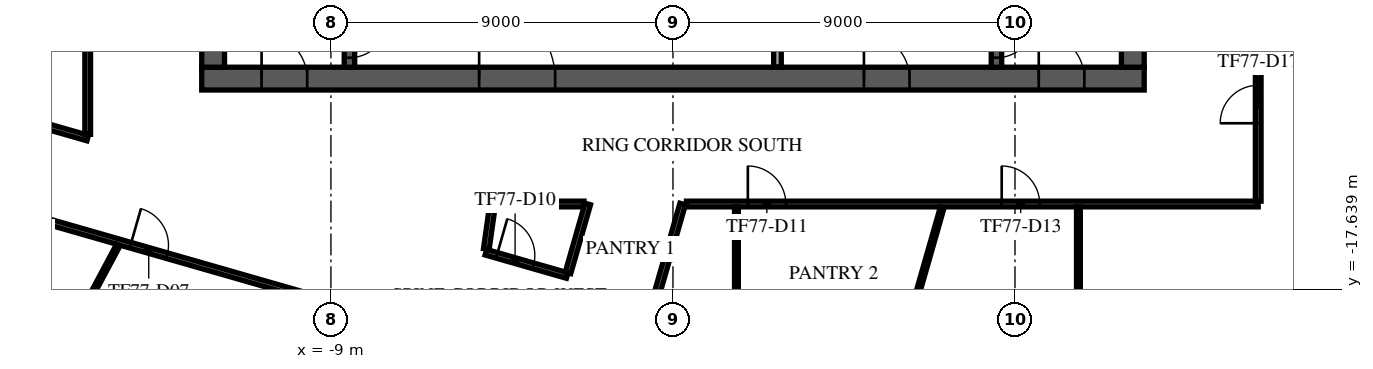
"""IFC4 building model, lengths in metres.
Left out: names, types, materials, properties, quantities, classifications, styles, units other than length and angle.
Written with IfcOpenShell. Run it as: python <this file> out.ifc"""

import sys

from ifc_helpers import new_model, si_unit, direction, frame, frame_2d, origin, place, context, subcontext, project, spatial, rectangle, extrude, element, fill, save


model = new_model("IFC4")
c1 = context("Model", 3, precision=1e-05, world=origin(), true_north=direction((0.0, 1.0)))
c2 = subcontext(c1, "Body", "Model", "MODEL_VIEW")
j1 = project(units=[si_unit("LENGTHUNIT", "METRE"), si_unit("PLANEANGLEUNIT", "RADIAN")], contexts=[c1])
p1 = place(None, origin())
s1 = spatial("IfcSite", under=j1, at=p1, CompositionType="ELEMENT")
p2 = place(p1, origin())
s2 = spatial("IfcBuilding", under=s1, at=p2, CompositionType="ELEMENT")
p3 = place(p2, frame((0.0, 0.0, 324.5)))
s3 = spatial("IfcBuildingStorey", under=s2, at=p3, CompositionType="ELEMENT", Elevation=324.5)
p4 = place(p3, frame((-12.4, -12.1, 0.0), z_axis=(0.0, 0.0, 1.0), x_axis=(1.0, 0.0, 0.0)))
e1 = element("IfcWall", 1, at=p4, inside=s3, PredefinedType="SHEAR", context=c2, shape_type="SweptSolid", body=[
    extrude(rectangle(XDim=24.8, YDim=0.6, at=frame_2d((12.4, 0.0))), origin(), (0.0, 0.0, 1.0), 3.65),
])
p5 = place(p4, frame((7.3, 0.0, 0.0)))
e2 = element("IfcOpeningElement", 2, at=p5, cuts=e1, PredefinedType="OPENING", context=c2, shape_type="SweptSolid", body=[
    extrude(rectangle(XDim=2.0, YDim=2.1, at=frame_2d((1.0, 1.05))), frame((0.0, 0.31, 0.0), z_axis=(0.0, -1.0, 0.0), x_axis=(1.0, 0.0, 0.0)), (0.0, 0.0, 1.0), 0.62),
])
p6 = place(p4, frame((17.425, 0.0, 0.0)))
e3 = element("IfcOpeningElement", 3, at=p6, cuts=e1, PredefinedType="OPENING", context=c2, shape_type="SweptSolid", body=[
    extrude(rectangle(XDim=1.2, YDim=2.1, at=frame_2d((0.6, 1.05))), frame((0.0, 0.31, 0.0), z_axis=(0.0, -1.0, 0.0), x_axis=(1.0, 0.0, 0.0)), (0.0, 0.0, 1.0), 0.62),
])
p7 = place(p4, frame((1.575, 0.0, 0.0)))
e4 = element("IfcOpeningElement", 4, at=p7, cuts=e1, PredefinedType="OPENING", context=c2, shape_type="SweptSolid", body=[
    extrude(rectangle(XDim=1.2, YDim=2.1, at=frame_2d((0.6, 1.05))), frame((0.0, 0.31, 0.0), z_axis=(0.0, -1.0, 0.0), x_axis=(1.0, 0.0, 0.0)), (0.0, 0.0, 1.0), 0.62),
])
p8 = place(p4, frame((22.025, 0.0, 0.0)))
e5 = element("IfcOpeningElement", 5, at=p8, cuts=e1, PredefinedType="OPENING", context=c2, shape_type="SweptSolid", body=[
    extrude(rectangle(XDim=1.2, YDim=2.1, at=frame_2d((0.6, 1.05))), frame((0.0, 0.31, 0.0), z_axis=(0.0, -1.0, 0.0), x_axis=(1.0, 0.0, 0.0)), (0.0, 0.0, 1.0), 0.62),
])
p9 = place(p3, frame((12.1, -11.8, 0.0), z_axis=(0.0, 0.0, 1.0), x_axis=(0.0, 1.0, 0.0)))
e6 = element("IfcWall", 6, at=p9, inside=s3, PredefinedType="SHEAR", context=c2, shape_type="SweptSolid", body=[
    extrude(rectangle(XDim=23.6, YDim=0.6, at=frame_2d((11.8, 0.0))), origin(), (0.0, 0.0, 1.0), 3.65),
])
p10 = place(p9, frame((10.6, 0.0, 0.0)))
e7 = element("IfcOpeningElement", 7, at=p10, cuts=e6, PredefinedType="OPENING", context=c2, shape_type="SweptSolid", body=[
    extrude(rectangle(XDim=2.4, YDim=2.4, at=frame_2d((1.2, 1.2))), frame((0.0, 0.31, 0.0), z_axis=(0.0, -1.0, 0.0), x_axis=(1.0, 0.0, 0.0)), (0.0, 0.0, 1.0), 0.62),
])
p11 = place(p3, frame((-12.1, -11.8, 0.0), z_axis=(0.0, 0.0, 1.0), x_axis=(0.0, 1.0, 0.0)))
e8 = element("IfcWall", 8, at=p11, inside=s3, PredefinedType="SHEAR", context=c2, shape_type="SweptSolid", body=[
    extrude(rectangle(XDim=23.6, YDim=0.6, at=frame_2d((11.8, 0.0))), origin(), (0.0, 0.0, 1.0), 3.65),
])
p12 = place(p11, frame((10.6, 0.0, 0.0)))
e9 = element("IfcOpeningElement", 9, at=p12, cuts=e8, PredefinedType="OPENING", context=c2, shape_type="SweptSolid", body=[
    extrude(rectangle(XDim=2.4, YDim=2.4, at=frame_2d((1.2, 1.2))), frame((0.0, 0.31, 0.0), z_axis=(0.0, -1.0, 0.0), x_axis=(1.0, 0.0, 0.0)), (0.0, 0.0, 1.0), 0.62),
])
p13 = place(p3, frame((-8.512, -4.55, 0.0), z_axis=(0.0, 0.0, 1.0), x_axis=(0.0, -1.0, 0.0)))
e10 = element("IfcWall", 10, at=p13, inside=s3, PredefinedType="SOLIDWALL", context=c2, shape_type="SweptSolid", body=[
    extrude(rectangle(XDim=7.25, YDim=0.275, at=frame_2d((3.625, 0.0))), origin(), (0.0, 0.0, 1.0), 3.65),
])
p14 = place(p13, frame((6.0, 0.0, 0.0)))
e11 = element("IfcOpeningElement", 11, at=p14, cuts=e10, PredefinedType="OPENING", context=c2, shape_type="SweptSolid", body=[
    extrude(rectangle(XDim=1.0, YDim=2.1, at=frame_2d((0.5, 1.05))), frame((0.0, 0.147, 0.0), z_axis=(0.0, -1.0, 0.0), x_axis=(1.0, 0.0, 0.0)), (0.0, 0.0, 1.0), 0.295),
])
p15 = place(p3, frame((8.512, -4.55, 0.0), z_axis=(0.0, 0.0, 1.0), x_axis=(0.0, -1.0, 0.0)))
e12 = element("IfcWall", 12, at=p15, inside=s3, PredefinedType="SOLIDWALL", context=c2, shape_type="SweptSolid", body=[
    extrude(rectangle(XDim=7.25, YDim=0.275, at=frame_2d((3.625, 0.0))), origin(), (0.0, 0.0, 1.0), 3.65),
])
p16 = place(p15, frame((6.0, 0.0, 0.0)))
e13 = element("IfcOpeningElement", 13, at=p16, cuts=e12, PredefinedType="OPENING", context=c2, shape_type="SweptSolid", body=[
    extrude(rectangle(XDim=1.0, YDim=2.1, at=frame_2d((0.5, 1.05))), frame((0.0, 0.147, 0.0), z_axis=(0.0, -1.0, 0.0), x_axis=(1.0, 0.0, 0.0)), (0.0, 0.0, 1.0), 0.295),
])
p17 = place(p3, frame((2.75, -11.795, 0.0), z_axis=(0.0, 0.0, 1.0), x_axis=(0.0, 1.0, 0.0)))
e14 = element("IfcWall", 14, at=p17, inside=s3, PredefinedType="PARTITIONING", context=c2, shape_type="SweptSolid", body=[
    extrude(rectangle(XDim=2.99, YDim=0.2, at=frame_2d((1.495, 0.0))), origin(), (0.0, 0.0, 1.0), 3.65),
])
p18 = place(p3, frame((-24.007, -13.694, 0.0), z_axis=(0.0, 0.0, 1.0), x_axis=(0.961264140923, -0.275628828998, 0.0)))
e15 = element("IfcWall", 15, at=p18, inside=s3, PredefinedType="PARTITIONING", context=c2, shape_type="SweptSolid", body=[
    extrude(rectangle(XDim=38.68, YDim=0.15, at=frame_2d((19.34, 0.0))), origin(), (0.0, 0.0, 1.0), 3.25),
])
p19 = place(p18, frame((0.3, 0.0, 0.0)))
e16 = element("IfcOpeningElement", 16, at=p19, cuts=e15, PredefinedType="OPENING", context=c2, shape_type="SweptSolid", body=[
    extrude(rectangle(XDim=1.8, YDim=2.1, at=frame_2d((0.9, 1.05))), frame((0.0, 0.085, 0.0), z_axis=(0.0, -1.0, 0.0), x_axis=(1.0, 0.0, 0.0)), (0.0, 0.0, 1.0), 0.17),
])
p20 = place(p18, frame((5.55, 0.0, 0.0)))
e17 = element("IfcOpeningElement", 17, at=p20, cuts=e15, PredefinedType="OPENING", context=c2, shape_type="SweptSolid", body=[
    extrude(rectangle(XDim=1.0, YDim=2.1, at=frame_2d((0.5, 1.05))), frame((0.0, 0.085, 0.0), z_axis=(0.0, -1.0, 0.0), x_axis=(1.0, 0.0, 0.0)), (0.0, 0.0, 1.0), 0.17),
])
p21 = place(p18, frame((10.125, 0.0, 0.0)))
e18 = element("IfcOpeningElement", 18, at=p21, cuts=e15, PredefinedType="OPENING", context=c2, shape_type="SweptSolid", body=[
    extrude(rectangle(XDim=1.0, YDim=2.1, at=frame_2d((0.5, 1.05))), frame((0.0, 0.085, 0.0), z_axis=(0.0, -1.0, 0.0), x_axis=(1.0, 0.0, 0.0)), (0.0, 0.0, 1.0), 0.17),
])
p22 = place(p18, frame((23.776, 0.0, 0.0)))
e19 = element("IfcOpeningElement", 19, at=p22, cuts=e15, PredefinedType="OPENING", context=c2, shape_type="SweptSolid", body=[
    extrude(rectangle(XDim=1.0, YDim=2.1, at=frame_2d((0.5, 1.05))), frame((0.0, 0.085, 0.0), z_axis=(0.0, -1.0, 0.0), x_axis=(1.0, 0.0, 0.0)), (0.0, 0.0, 1.0), 0.17),
])
p23 = place(p18, frame((31.675, 0.0, 0.0)))
e20 = element("IfcOpeningElement", 20, at=p23, cuts=e15, PredefinedType="OPENING", context=c2, shape_type="SweptSolid", body=[
    extrude(rectangle(XDim=1.8, YDim=2.1, at=frame_2d((0.9, 1.05))), frame((0.0, 0.085, 0.0), z_axis=(0.0, -1.0, 0.0), x_axis=(1.0, 0.0, 0.0)), (0.0, 0.0, 1.0), 0.17),
])
p24 = place(p3, frame((-23.345, -11.387, 0.0), z_axis=(0.0, 0.0, 1.0), x_axis=(0.961258213807, -0.275649499163, 0.0)))
e21 = element("IfcWall", 21, at=p24, inside=s3, PredefinedType="PARTITIONING", context=c2, shape_type="SweptSolid", body=[
    extrude(rectangle(XDim=8.265, YDim=0.15, at=frame_2d((4.133, 0.0))), origin(), (0.0, 0.0, 1.0), 3.25),
])
p25 = place(p3, frame((-15.4, -13.565, 0.0), z_axis=(0.0, 0.0, 1.0), x_axis=(0.0, 1.0, 0.0)))
e22 = element("IfcWall", 22, at=p25, inside=s3, PredefinedType="PARTITIONING", context=c2, shape_type="SweptSolid", body=[
    extrude(rectangle(XDim=28.965, YDim=0.15, at=frame_2d((14.483, 0.0))), origin(), (0.0, 0.0, 1.0), 3.25),
])
p26 = place(p25, frame((5.986, 0.0, 0.0)))
e23 = element("IfcOpeningElement", 23, at=p26, cuts=e22, PredefinedType="OPENING", context=c2, shape_type="SweptSolid", body=[
    extrude(rectangle(XDim=1.0, YDim=2.1, at=frame_2d((0.5, 1.05))), frame((0.0, 0.085, 0.0), z_axis=(0.0, -1.0, 0.0), x_axis=(1.0, 0.0, 0.0)), (0.0, 0.0, 1.0), 0.17),
])
p27 = place(p25, frame((17.249, 0.0, 0.0)))
e24 = element("IfcOpeningElement", 24, at=p27, cuts=e22, PredefinedType="OPENING", context=c2, shape_type="SweptSolid", body=[
    extrude(rectangle(XDim=1.0, YDim=2.1, at=frame_2d((0.5, 1.05))), frame((0.0, 0.085, 0.0), z_axis=(0.0, -1.0, 0.0), x_axis=(1.0, 0.0, 0.0)), (0.0, 0.0, 1.0), 0.17),
])
p28 = place(p25, frame((25.571, 0.0, 0.0)))
e25 = element("IfcOpeningElement", 25, at=p28, cuts=e22, PredefinedType="OPENING", context=c2, shape_type="SweptSolid", body=[
    extrude(rectangle(XDim=1.0, YDim=2.1, at=frame_2d((0.5, 1.05))), frame((0.0, 0.085, 0.0), z_axis=(0.0, -1.0, 0.0), x_axis=(1.0, 0.0, 0.0)), (0.0, 0.0, 1.0), 0.17),
])
p29 = place(p3, frame((-4.923, -16.669, 0.0), z_axis=(0.0, 0.0, 1.0), x_axis=(0.961254639508, -0.275661963325, 0.0)))
e26 = element("IfcWall", 26, at=p29, inside=s3, PredefinedType="PARTITIONING", context=c2, shape_type="SweptSolid", body=[
    extrude(rectangle(XDim=2.227, YDim=0.15, at=frame_2d((1.114, 0.0))), origin(), (0.0, 0.0, 1.0), 3.65),
])
p30 = place(p29, frame((0.3, 0.0, 0.0)))
e27 = element("IfcOpeningElement", 27, at=p30, cuts=e26, PredefinedType="OPENING", context=c2, shape_type="SweptSolid", body=[
    extrude(rectangle(XDim=1.0, YDim=2.1, at=frame_2d((0.5, 1.05))), frame((0.0, 0.085, 0.0), z_axis=(0.0, -1.0, 0.0), x_axis=(1.0, 0.0, 0.0)), (0.0, 0.0, 1.0), 0.17),
])
p31 = place(p3, frame((-4.911, -16.583, 0.0), z_axis=(0.0, 0.0, 1.0), x_axis=(0.139705462727, 0.99019310424, 0.0)))
e28 = element("IfcWall", 28, at=p31, inside=s3, PredefinedType="PARTITIONING", context=c2, shape_type="SweptSolid", body=[
    extrude(rectangle(XDim=1.195, YDim=0.15, at=frame_2d((0.598, 0.0))), origin(), (0.0, 0.0, 1.0), 3.65),
])
p32 = place(p3, frame((-4.658, -15.4, 0.0), z_axis=(0.0, 0.0, 1.0), x_axis=(1.0, 0.0, 0.0)))
e29 = element("IfcWall", 29, at=p32, inside=s3, PredefinedType="PARTITIONING", context=c2, shape_type="SweptSolid", body=[
    extrude(rectangle(XDim=2.316, YDim=0.15, at=frame_2d((1.158, 0.0))), origin(), (0.0, 0.0, 1.0), 3.25),
])
p33 = place(p3, frame((-2.761, -17.211, 0.0), z_axis=(0.0, 0.0, 1.0), x_axis=(0.275628103307, 0.961264349005, 0.0)))
e30 = element("IfcWall", 30, at=p33, inside=s3, PredefinedType="PARTITIONING", context=c2, shape_type="SweptSolid", body=[
    extrude(rectangle(XDim=1.884, YDim=0.15, at=frame_2d((0.942, 0.0))), origin(), (0.0, 0.0, 1.0), 3.25),
])
p34 = place(p3, frame((-0.475, -17.944, 0.0), z_axis=(0.0, 0.0, 1.0), x_axis=(0.275793011759, 0.961217048676, 0.0)))
e31 = element("IfcWall", 31, at=p34, inside=s3, PredefinedType="PARTITIONING", context=c2, shape_type="SweptSolid", body=[
    extrude(rectangle(XDim=2.647, YDim=0.15, at=frame_2d((1.323, 0.0))), origin(), (0.0, 0.0, 1.0), 3.65),
])
p35 = place(p3, frame((0.354, -15.4, 0.0), z_axis=(0.0, 0.0, 1.0), x_axis=(1.0, 0.0, 0.0)))
e32 = element("IfcWall", 32, at=p35, inside=s3, PredefinedType="PARTITIONING", context=c2, shape_type="SweptSolid", body=[
    extrude(rectangle(XDim=15.045, YDim=0.15, at=frame_2d((7.523, 0.0))), origin(), (0.0, 0.0, 1.0), 3.25),
])
p36 = place(p35, frame((1.616, 0.0, 0.0)))
e33 = element("IfcOpeningElement", 33, at=p36, cuts=e32, PredefinedType="OPENING", context=c2, shape_type="SweptSolid", body=[
    extrude(rectangle(XDim=1.0, YDim=2.1, at=frame_2d((0.5, 1.05))), frame((0.0, 0.085, 0.0), z_axis=(0.0, -1.0, 0.0), x_axis=(1.0, 0.0, 0.0)), (0.0, 0.0, 1.0), 0.17),
])
p37 = place(p35, frame((8.295, 0.0, 0.0)))
e34 = element("IfcOpeningElement", 34, at=p37, cuts=e32, PredefinedType="OPENING", context=c2, shape_type="SweptSolid", body=[
    extrude(rectangle(XDim=1.0, YDim=2.1, at=frame_2d((0.5, 1.05))), frame((0.0, 0.085, 0.0), z_axis=(0.0, -1.0, 0.0), x_axis=(1.0, 0.0, 0.0)), (0.0, 0.0, 1.0), 0.17),
])
p38 = place(p3, frame((15.4, -15.325, 0.0), z_axis=(0.0, 0.0, 1.0), x_axis=(0.0, 1.0, 0.0)))
e35 = element("IfcWall", 35, at=p38, inside=s3, PredefinedType="PARTITIONING", context=c2, shape_type="SweptSolid", body=[
    extrude(rectangle(XDim=27.65, YDim=0.15, at=frame_2d((13.825, 0.0))), origin(), (0.0, 0.0, 1.0), 3.25),
])
p39 = place(p38, frame((2.05, 0.0, 0.0)))
e36 = element("IfcOpeningElement", 36, at=p39, cuts=e35, PredefinedType="OPENING", context=c2, shape_type="SweptSolid", body=[
    extrude(rectangle(XDim=1.0, YDim=2.1, at=frame_2d((0.5, 1.05))), frame((0.0, 0.085, 0.0), z_axis=(0.0, -1.0, 0.0), x_axis=(1.0, 0.0, 0.0)), (0.0, 0.0, 1.0), 0.17),
])
p40 = place(p38, frame((9.474, 0.0, 0.0)))
e37 = element("IfcOpeningElement", 37, at=p40, cuts=e35, PredefinedType="OPENING", context=c2, shape_type="SweptSolid", body=[
    extrude(rectangle(XDim=1.0, YDim=2.1, at=frame_2d((0.5, 1.05))), frame((0.0, 0.085, 0.0), z_axis=(0.0, -1.0, 0.0), x_axis=(1.0, 0.0, 0.0)), (0.0, 0.0, 1.0), 0.17),
])
p41 = place(p38, frame((19.271, 0.0, 0.0)))
e38 = element("IfcOpeningElement", 38, at=p41, cuts=e35, PredefinedType="OPENING", context=c2, shape_type="SweptSolid", body=[
    extrude(rectangle(XDim=1.0, YDim=2.1, at=frame_2d((0.5, 1.05))), frame((0.0, 0.085, 0.0), z_axis=(0.0, -1.0, 0.0), x_axis=(1.0, 0.0, 0.0)), (0.0, 0.0, 1.0), 0.17),
])
p42 = place(p3, frame((-19.19, -25.08, 0.0), z_axis=(0.0, 0.0, 1.0), x_axis=(0.471201621995, 0.882025527652, 0.0)))
e39 = element("IfcWall", 39, at=p42, inside=s3, PredefinedType="PARTITIONING", context=c2, shape_type="SweptSolid", body=[
    extrude(rectangle(XDim=9.749, YDim=0.1, at=frame_2d((4.875, 0.0))), origin(), (0.0, 0.0, 1.0), 3.05),
])
p43 = place(p3, frame((1.67, -18.467, 0.0), z_axis=(0.0, 0.0, 1.0), x_axis=(0.0, 1.0, 0.0)))
e40 = element("IfcWall", 40, at=p43, inside=s3, PredefinedType="PARTITIONING", context=c2, shape_type="SweptSolid", body=[
    extrude(rectangle(XDim=2.992, YDim=0.1, at=frame_2d((1.496, 0.0))), origin(), (0.0, 0.0, 1.0), 3.65),
])
p44 = place(p3, frame((5.882, -19.689, 0.0), z_axis=(0.0, 0.0, 1.0), x_axis=(0.275577071069, 0.961278980266, 0.0)))
e41 = element("IfcWall", 41, at=p44, inside=s3, PredefinedType="PARTITIONING", context=c2, shape_type="SweptSolid", body=[
    extrude(rectangle(XDim=4.369, YDim=0.1, at=frame_2d((2.185, 0.0))), origin(), (0.0, 0.0, 1.0), 3.65),
])
p45 = place(p3, frame((10.669, -21.048, 0.0), z_axis=(0.0, 0.0, 1.0), x_axis=(0.0, 1.0, 0.0)))
e42 = element("IfcWall", 42, at=p45, inside=s3, PredefinedType="PARTITIONING", context=c2, shape_type="SweptSolid", body=[
    extrude(rectangle(XDim=5.573, YDim=0.1, at=frame_2d((2.786, 0.0))), origin(), (0.0, 0.0, 1.0), 3.65),
])
p46 = place(p5, origin())
e43 = element("IfcDoor", 43, at=p46, inside=s3, OperationType="SINGLE_SWING_LEFT", PredefinedType="DOOR", context=c2, shape_type="SweptSolid", body=[
    extrude(rectangle(XDim=2.0, YDim=2.1, at=frame_2d((1.0, 1.05))), frame((0.0, 0.025, 0.0), z_axis=(0.0, -1.0, 0.0), x_axis=(1.0, 0.0, 0.0)), (0.0, 0.0, 1.0), 0.05),
])
fill(e2, e43)
p47 = place(p6, origin())
e44 = element("IfcDoor", 44, at=p47, inside=s3, OperationType="SINGLE_SWING_LEFT", PredefinedType="DOOR", context=c2, shape_type="SweptSolid", body=[
    extrude(rectangle(XDim=1.2, YDim=2.1, at=frame_2d((0.6, 1.05))), frame((0.0, 0.025, 0.0), z_axis=(0.0, -1.0, 0.0), x_axis=(1.0, 0.0, 0.0)), (0.0, 0.0, 1.0), 0.05),
])
fill(e3, e44)
p48 = place(p7, origin())
e45 = element("IfcDoor", 45, at=p48, inside=s3, OperationType="SINGLE_SWING_LEFT", PredefinedType="DOOR", context=c2, shape_type="SweptSolid", body=[
    extrude(rectangle(XDim=1.2, YDim=2.1, at=frame_2d((0.6, 1.05))), frame((0.0, 0.025, 0.0), z_axis=(0.0, -1.0, 0.0), x_axis=(1.0, 0.0, 0.0)), (0.0, 0.0, 1.0), 0.05),
])
fill(e4, e45)
p49 = place(p8, origin())
e46 = element("IfcDoor", 46, at=p49, inside=s3, OperationType="SINGLE_SWING_LEFT", PredefinedType="DOOR", context=c2, shape_type="SweptSolid", body=[
    extrude(rectangle(XDim=1.2, YDim=2.1, at=frame_2d((0.6, 1.05))), frame((0.0, 0.025, 0.0), z_axis=(0.0, -1.0, 0.0), x_axis=(1.0, 0.0, 0.0)), (0.0, 0.0, 1.0), 0.05),
])
fill(e5, e46)
p50 = place(p14, origin())
e47 = element("IfcDoor", 47, at=p50, inside=s3, OperationType="SINGLE_SWING_LEFT", PredefinedType="DOOR", context=c2, shape_type="SweptSolid", body=[
    extrude(rectangle(XDim=1.0, YDim=2.1, at=frame_2d((0.5, 1.05))), frame((0.0, 0.025, 0.0), z_axis=(0.0, -1.0, 0.0), x_axis=(1.0, 0.0, 0.0)), (0.0, 0.0, 1.0), 0.05),
])
fill(e11, e47)
p51 = place(p16, origin())
e48 = element("IfcDoor", 48, at=p51, inside=s3, OperationType="SINGLE_SWING_LEFT", PredefinedType="DOOR", context=c2, shape_type="SweptSolid", body=[
    extrude(rectangle(XDim=1.0, YDim=2.1, at=frame_2d((0.5, 1.05))), frame((0.0, 0.025, 0.0), z_axis=(0.0, -1.0, 0.0), x_axis=(1.0, 0.0, 0.0)), (0.0, 0.0, 1.0), 0.05),
])
fill(e13, e48)
p52 = place(p21, frame((1.0, 0.0, 0.0), z_axis=(0.0, 0.0, 1.0), x_axis=(-1.0, 0.0, 0.0)))
e49 = element("IfcDoor", 49, at=p52, inside=s3, OperationType="SINGLE_SWING_LEFT", PredefinedType="DOOR", context=c2, shape_type="SweptSolid", body=[
    extrude(rectangle(XDim=1.0, YDim=2.1, at=frame_2d((0.5, 1.05))), frame((0.0, 0.025, 0.0), z_axis=(0.0, -1.0, 0.0), x_axis=(1.0, 0.0, 0.0)), (0.0, 0.0, 1.0), 0.05),
])
fill(e18, e49)
p53 = place(p30, origin())
e50 = element("IfcDoor", 50, at=p53, inside=s3, OperationType="SINGLE_SWING_RIGHT", PredefinedType="DOOR", context=c2, shape_type="SweptSolid", body=[
    extrude(rectangle(XDim=1.0, YDim=2.1, at=frame_2d((0.5, 1.05))), frame((0.0, 0.025, 0.0), z_axis=(0.0, -1.0, 0.0), x_axis=(1.0, 0.0, 0.0)), (0.0, 0.0, 1.0), 0.05),
])
fill(e27, e50)
p54 = place(p36, frame((1.0, 0.0, 0.0), z_axis=(0.0, 0.0, 1.0), x_axis=(-1.0, 0.0, 0.0)))
e51 = element("IfcDoor", 51, at=p54, inside=s3, OperationType="SINGLE_SWING_RIGHT", PredefinedType="DOOR", context=c2, shape_type="SweptSolid", body=[
    extrude(rectangle(XDim=1.0, YDim=2.1, at=frame_2d((0.5, 1.05))), frame((0.0, 0.025, 0.0), z_axis=(0.0, -1.0, 0.0), x_axis=(1.0, 0.0, 0.0)), (0.0, 0.0, 1.0), 0.05),
])
fill(e33, e51)
p55 = place(p37, frame((1.0, 0.0, 0.0), z_axis=(0.0, 0.0, 1.0), x_axis=(-1.0, 0.0, 0.0)))
e52 = element("IfcDoor", 52, at=p55, inside=s3, OperationType="SINGLE_SWING_RIGHT", PredefinedType="DOOR", context=c2, shape_type="SweptSolid", body=[
    extrude(rectangle(XDim=1.0, YDim=2.1, at=frame_2d((0.5, 1.05))), frame((0.0, 0.025, 0.0), z_axis=(0.0, -1.0, 0.0), x_axis=(1.0, 0.0, 0.0)), (0.0, 0.0, 1.0), 0.05),
])
fill(e34, e52)
p56 = place(p39, frame((1.0, 0.0, 0.0), z_axis=(0.0, 0.0, 1.0), x_axis=(-1.0, 0.0, 0.0)))
e53 = element("IfcDoor", 53, at=p56, inside=s3, OperationType="SINGLE_SWING_RIGHT", PredefinedType="DOOR", context=c2, shape_type="SweptSolid", body=[
    extrude(rectangle(XDim=1.0, YDim=2.1, at=frame_2d((0.5, 1.05))), frame((0.0, 0.025, 0.0), z_axis=(0.0, -1.0, 0.0), x_axis=(1.0, 0.0, 0.0)), (0.0, 0.0, 1.0), 0.05),
])
fill(e36, e53)
save(model, sys.argv[1])
